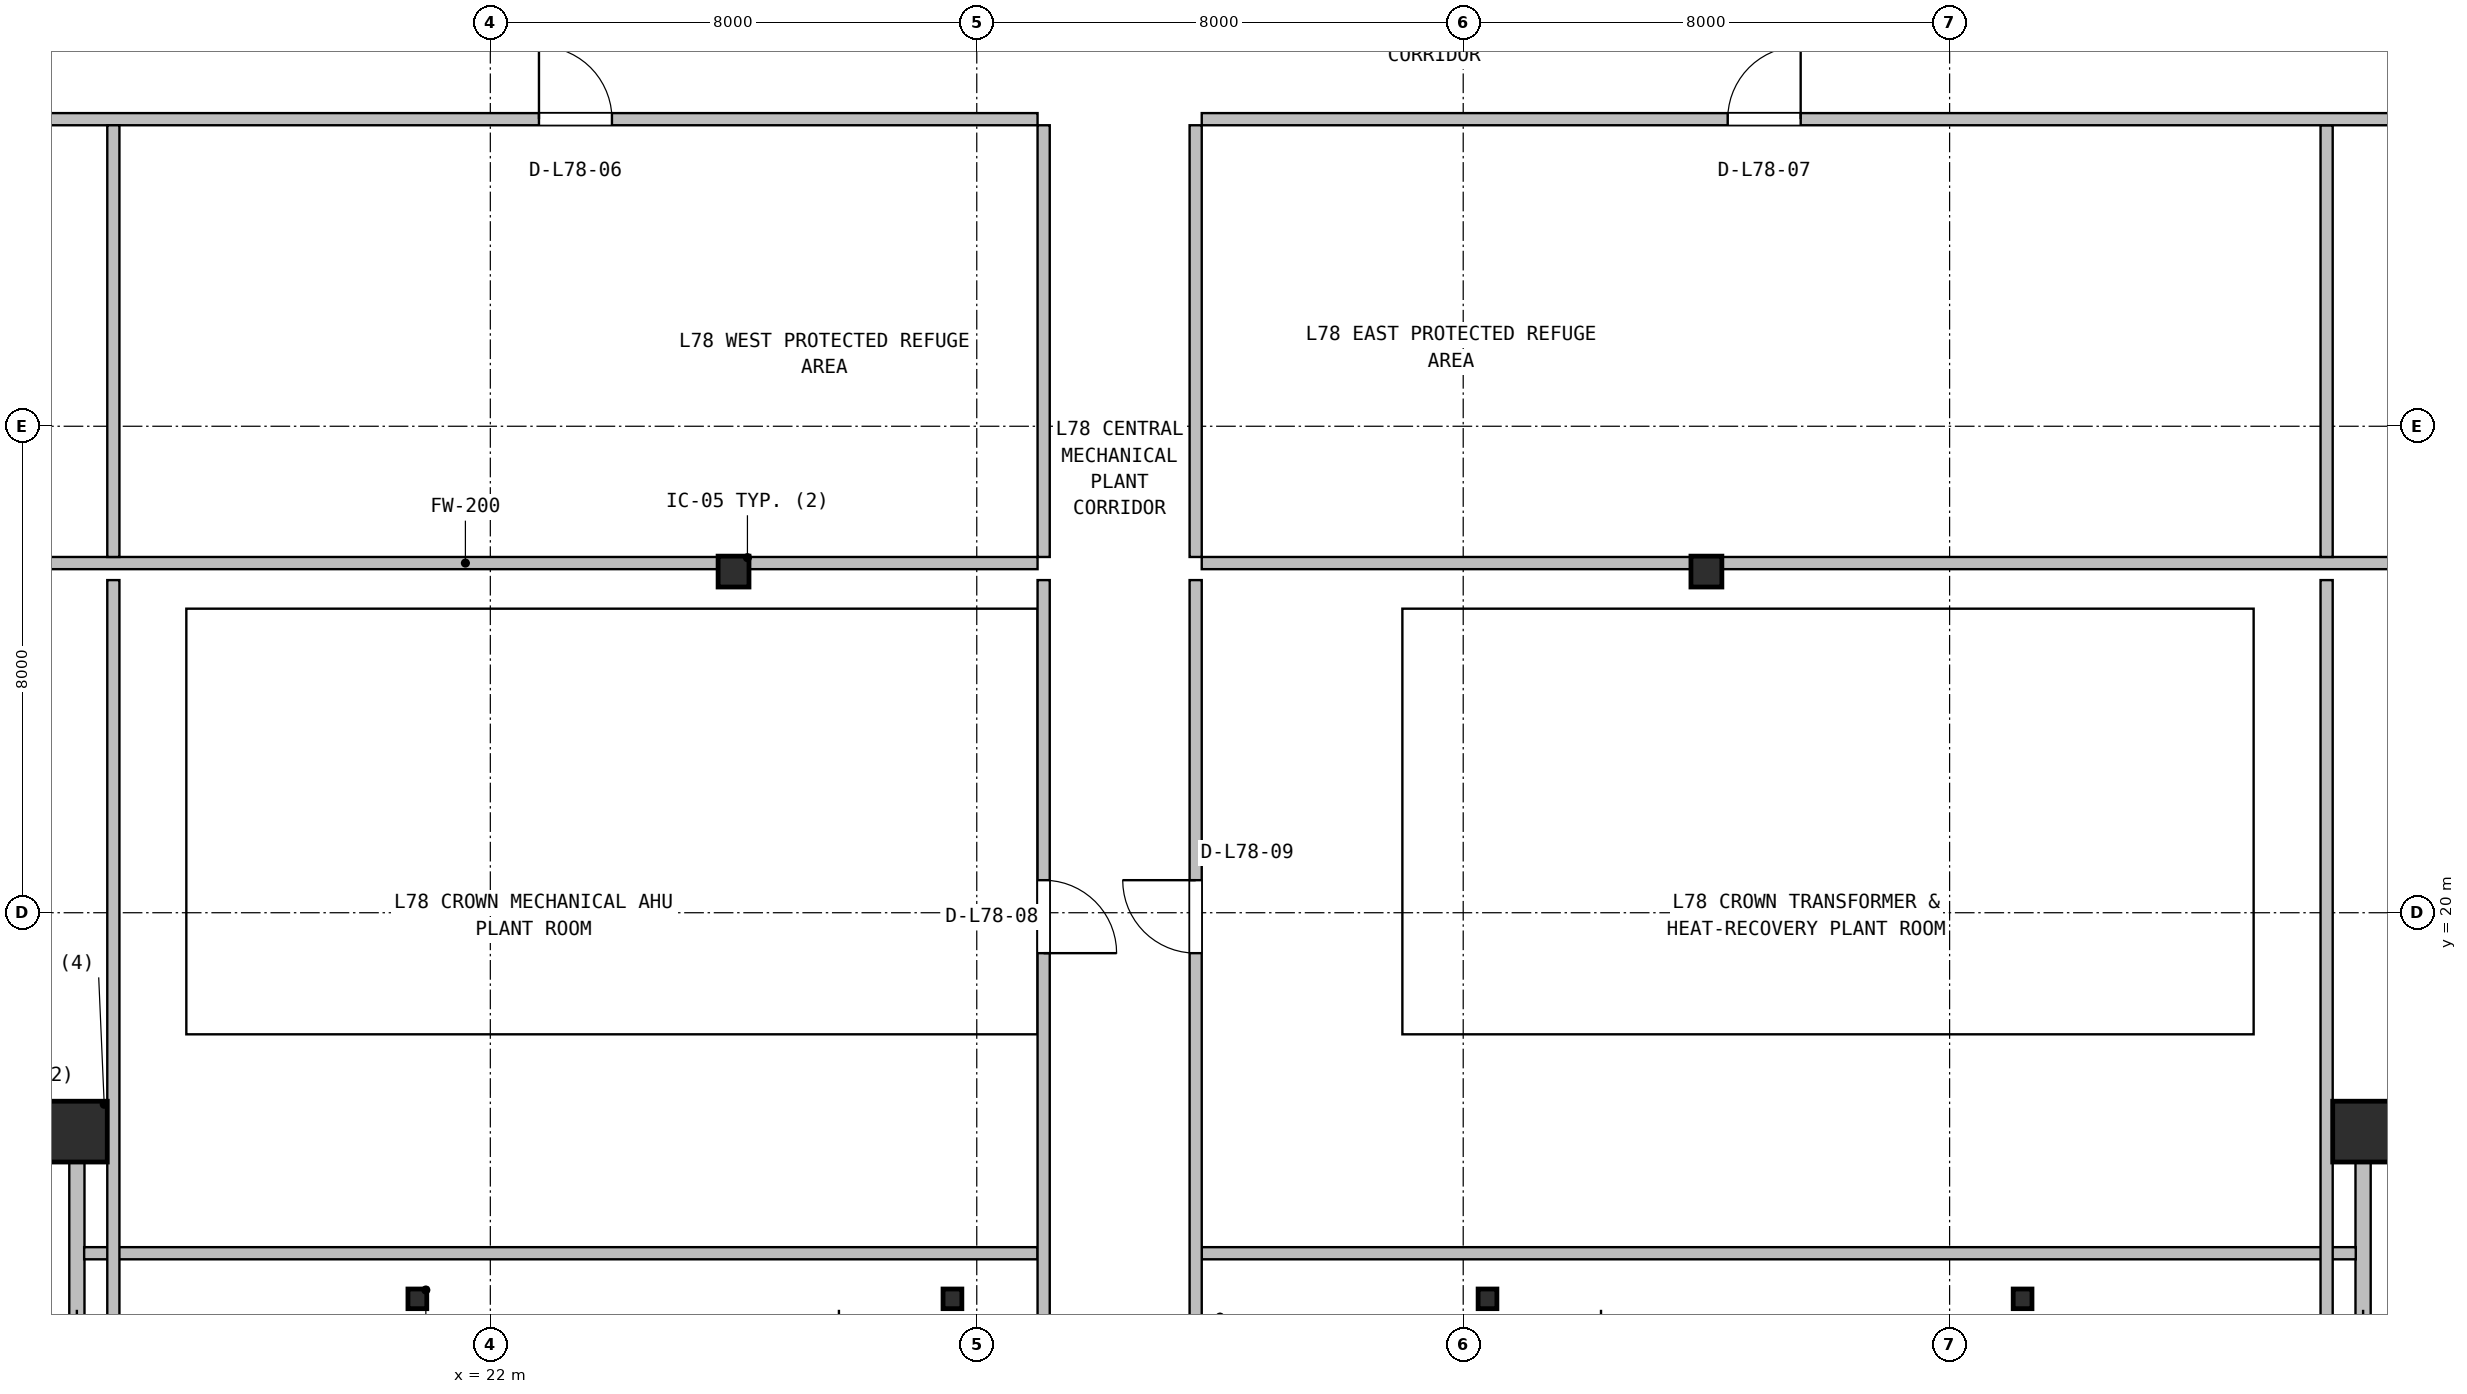
"""IFC4 building model, lengths in metres.
Left out: names, types, materials, properties, quantities, classifications, styles, units other than length and angle.
Written with IfcOpenShell. Run it as: python <this file> out.ifc"""

import sys

from ifc_helpers import new_model, si_unit, direction, frame, frame_2d, origin, origin_2d, place, context, subcontext, project, spatial, rectangle, hollow_rectangle, hollow_circle, i_section, extrude, source, transform, mapped, element, fill, save


model = new_model("IFC4")
c1 = context("Model", 3, precision=1e-05, world=origin(), true_north=direction((0.0, 1.0)))
c2 = subcontext(c1, "Body", "Model", "MODEL_VIEW")
j1 = project(units=[si_unit("LENGTHUNIT", "METRE"), si_unit("PLANEANGLEUNIT", "RADIAN")], contexts=[c1])
p1 = place(None, origin())
s1 = spatial("IfcSite", under=j1, at=p1, CompositionType="ELEMENT")
p2 = place(p1, origin())
s2 = spatial("IfcBuilding", under=s1, at=p2, CompositionType="ELEMENT")
p3 = place(p2, frame((0.0, 0.0, 314.6)))
s3 = spatial("IfcBuildingStorey", under=s2, at=p3, CompositionType="ELEMENT", Elevation=314.6)
m1 = source(origin(), c2, "Body", "SweptSolid", [
    extrude(hollow_rectangle(XDim=1.0, YDim=1.0, WallThickness=0.04, at=origin_2d()), origin(), (0.0, 0.0, 1.0), 5.2),
])
for number, where, z_axis, x_axis in (
    (1, (15.2, 16.4, 0.0), (0.0, 0.0, 1.0), (1.0, 0.0, 0.0)),
    (2, (52.8, 16.4, 0.0), (0.0, 0.0, 1.0), (1.0, 0.0, 0.0)),
):
    element("IfcColumn", number, at=place(p3, frame(where, z_axis=z_axis, x_axis=x_axis)), inside=s3, PredefinedType="COLUMN", context=c2, shape_type="MappedRepresentation", body=[
        mapped(m1, transform((0.0, 0.0, 0.0), x_axis=(1.0, 0.0, 0.0), y_axis=(0.0, 1.0, 0.0), z_axis=(0.0, 0.0, 1.0), scale=1.0)),
    ])
m2 = source(origin(), c2, "Body", "SweptSolid", [
    extrude(i_section(OverallWidth=0.309, OverallDepth=0.323, WebThickness=0.014, FlangeThickness=0.023, FilletRadius=0.015, at=origin_2d()), origin(), (0.0, 0.0, 1.0), 5.2),
])
for number, where, z_axis, x_axis in (
    (3, (20.8, 13.65, 0.0), (0.0, 0.0, 1.0), (1.0, 0.0, 0.0)),
    (4, (29.6, 13.65, 0.0), (0.0, 0.0, 1.0), (1.0, 0.0, 0.0)),
    (5, (38.4, 13.65, 0.0), (0.0, 0.0, 1.0), (1.0, 0.0, 0.0)),
    (6, (47.2, 13.65, 0.0), (0.0, 0.0, 1.0), (1.0, 0.0, 0.0)),
):
    element("IfcColumn", number, at=place(p3, frame(where, z_axis=z_axis, x_axis=x_axis)), inside=s3, PredefinedType="COLUMN", context=c2, shape_type="MappedRepresentation", body=[
        mapped(m2, transform((0.0, 0.0, 0.0), x_axis=(1.0, 0.0, 0.0), y_axis=(0.0, 1.0, 0.0), z_axis=(0.0, 0.0, 1.0), scale=1.0)),
    ])
m3 = source(origin(), c2, "Body", "SweptSolid", [
    extrude(hollow_circle(Radius=0.254, WallThickness=0.02, at=origin_2d()), origin(), (0.0, 0.0, 1.0), 5.2),
])
for number, where, z_axis, x_axis in (
    (7, (26.0, 25.61, 0.0), (0.0, 0.0, 1.0), (1.0, 0.0, 0.0)),
    (8, (42.0, 25.61, 0.0), (0.0, 0.0, 1.0), (1.0, 0.0, 0.0)),
):
    element("IfcColumn", number, at=place(p3, frame(where, z_axis=z_axis, x_axis=x_axis)), inside=s3, PredefinedType="COLUMN", context=c2, shape_type="MappedRepresentation", body=[
        mapped(m3, transform((0.0, 0.0, 0.0), x_axis=(1.0, 0.0, 0.0), y_axis=(0.0, 1.0, 0.0), z_axis=(0.0, 0.0, 1.0), scale=1.0)),
    ])
for number, where, z_axis, x_axis in (
    (9, (15.2, 13.28, 0.0), (0.0, 0.0, 1.0), (0.0, 1.0, 0.0)),
    (10, (52.8, 13.28, 0.0), (0.0, 0.0, 1.0), (0.0, 1.0, 0.0)),
):
    element("IfcWall", number, at=place(p3, frame(where, z_axis=z_axis, x_axis=x_axis)), inside=s3, PredefinedType="SOLIDWALL", context=c2, shape_type="SweptSolid", body=[
        extrude(rectangle(XDim=3.2, YDim=0.25, at=frame_2d((1.6, 0.0))), origin(), (0.0, 0.0, 1.0), 3.525),
    ])
p4 = place(p3, frame((12.18, 25.75, 0.0), z_axis=(0.0, 0.0, 1.0), x_axis=(1.0, 0.0, 0.0)))
e11 = element("IfcWall", 11, at=p4, inside=s3, PredefinedType="SOLIDWALL", context=c2, shape_type="SweptSolid", body=[
    extrude(rectangle(XDim=18.82, YDim=0.2, at=frame_2d((9.41, 0.0))), origin(), (0.0, 0.0, 1.0), 3.525),
])
p5 = place(p3, frame((31.1, 25.85, 0.0), z_axis=(0.0, 0.0, 1.0), x_axis=(0.0, 1.0, 0.0)))
e12 = element("IfcWall", 12, at=p5, inside=s3, PredefinedType="SOLIDWALL", context=c2, shape_type="SweptSolid", body=[
    extrude(rectangle(XDim=7.1, YDim=0.2, at=frame_2d((3.55, 0.0))), origin(), (0.0, 0.0, 1.0), 4.478),
])
p6 = place(p3, frame((12.18, 33.05, 0.0), z_axis=(0.0, 0.0, 1.0), x_axis=(1.0, 0.0, 0.0)))
e13 = element("IfcWall", 13, at=p6, inside=s3, PredefinedType="SOLIDWALL", context=c2, shape_type="SweptSolid", body=[
    extrude(rectangle(XDim=18.82, YDim=0.2, at=frame_2d((9.41, 0.0))), origin(), (0.0, 0.0, 1.0), 3.525),
])
p7 = place(p6, frame((10.62, 0.0, 0.0)))
e14 = element("IfcOpeningElement", 14, at=p7, cuts=e13, PredefinedType="OPENING", context=c2, shape_type="SweptSolid", body=[
    extrude(rectangle(XDim=1.2, YDim=2.1, at=frame_2d((0.6, 1.05))), frame((0.0, 0.11, 0.0), z_axis=(0.0, -1.0, 0.0), x_axis=(1.0, 0.0, 0.0)), (0.0, 0.0, 1.0), 0.22),
])
p8 = place(p3, frame((15.8, 25.85, 0.0), z_axis=(0.0, 0.0, 1.0), x_axis=(0.0, 1.0, 0.0)))
e15 = element("IfcWall", 15, at=p8, inside=s3, PredefinedType="SOLIDWALL", context=c2, shape_type="SweptSolid", body=[
    extrude(rectangle(XDim=7.1, YDim=0.2, at=frame_2d((3.55, 0.0))), origin(), (0.0, 0.0, 1.0), 4.478),
])
p9 = place(p3, frame((33.7, 25.75, 0.0), z_axis=(0.0, 0.0, 1.0), x_axis=(1.0, 0.0, 0.0)))
e16 = element("IfcWall", 16, at=p9, inside=s3, PredefinedType="SOLIDWALL", context=c2, shape_type="SweptSolid", body=[
    extrude(rectangle(XDim=22.12, YDim=0.2, at=frame_2d((11.06, 0.0))), origin(), (0.0, 0.0, 1.0), 3.525),
])
p10 = place(p3, frame((52.2, 25.85, 0.0), z_axis=(0.0, 0.0, 1.0), x_axis=(0.0, 1.0, 0.0)))
e17 = element("IfcWall", 17, at=p10, inside=s3, PredefinedType="SOLIDWALL", context=c2, shape_type="SweptSolid", body=[
    extrude(rectangle(XDim=7.1, YDim=0.2, at=frame_2d((3.55, 0.0))), origin(), (0.0, 0.0, 1.0), 4.478),
])
p11 = place(p3, frame((33.7, 33.05, 0.0), z_axis=(0.0, 0.0, 1.0), x_axis=(1.0, 0.0, 0.0)))
e18 = element("IfcWall", 18, at=p11, inside=s3, PredefinedType="SOLIDWALL", context=c2, shape_type="SweptSolid", body=[
    extrude(rectangle(XDim=22.12, YDim=0.2, at=frame_2d((11.06, 0.0))), origin(), (0.0, 0.0, 1.0), 3.525),
])
p12 = place(p11, frame((8.65, 0.0, 0.0)))
e19 = element("IfcOpeningElement", 19, at=p12, cuts=e18, PredefinedType="OPENING", context=c2, shape_type="SweptSolid", body=[
    extrude(rectangle(XDim=1.2, YDim=2.1, at=frame_2d((0.6, 1.05))), frame((0.0, 0.11, 0.0), z_axis=(0.0, -1.0, 0.0), x_axis=(1.0, 0.0, 0.0)), (0.0, 0.0, 1.0), 0.22),
])
p13 = place(p3, frame((33.6, 25.85, 0.0), z_axis=(0.0, 0.0, 1.0), x_axis=(0.0, 1.0, 0.0)))
e20 = element("IfcWall", 20, at=p13, inside=s3, PredefinedType="SOLIDWALL", context=c2, shape_type="SweptSolid", body=[
    extrude(rectangle(XDim=7.1, YDim=0.2, at=frame_2d((3.55, 0.0))), origin(), (0.0, 0.0, 1.0), 4.478),
])
p14 = place(p3, frame((15.32, 14.4, 0.0), z_axis=(0.0, 0.0, 1.0), x_axis=(1.0, 0.0, 0.0)))
e21 = element("IfcWall", 21, at=p14, inside=s3, PredefinedType="SOLIDWALL", context=c2, shape_type="SweptSolid", body=[
    extrude(rectangle(XDim=15.68, YDim=0.2, at=frame_2d((7.84, 0.0))), origin(), (0.0, 0.0, 1.0), 3.525),
])
p15 = place(p3, frame((31.1, 13.38, 0.0), z_axis=(0.0, 0.0, 1.0), x_axis=(0.0, 1.0, 0.0)))
e22 = element("IfcWall", 22, at=p15, inside=s3, PredefinedType="SOLIDWALL", context=c2, shape_type="SweptSolid", body=[
    extrude(rectangle(XDim=12.09, YDim=0.2, at=frame_2d((6.045, 0.0))), origin(), (0.0, 0.0, 1.0), 3.525),
])
p16 = place(p15, frame((5.955, 0.0, 0.0)))
e23 = element("IfcOpeningElement", 23, at=p16, cuts=e22, PredefinedType="OPENING", context=c2, shape_type="SweptSolid", body=[
    extrude(rectangle(XDim=1.2, YDim=2.1, at=frame_2d((0.6, 1.05))), frame((0.0, 0.11, 0.0), z_axis=(0.0, -1.0, 0.0), x_axis=(1.0, 0.0, 0.0)), (0.0, 0.0, 1.0), 0.22),
])
p17 = place(p3, frame((15.8, 13.38, 0.0), z_axis=(0.0, 0.0, 1.0), x_axis=(0.0, 1.0, 0.0)))
e24 = element("IfcWall", 24, at=p17, inside=s3, PredefinedType="SOLIDWALL", context=c2, shape_type="SweptSolid", body=[
    extrude(rectangle(XDim=12.09, YDim=0.2, at=frame_2d((6.045, 0.0))), origin(), (0.0, 0.0, 1.0), 3.525),
])
p18 = place(p3, frame((33.7, 14.4, 0.0), z_axis=(0.0, 0.0, 1.0), x_axis=(1.0, 0.0, 0.0)))
e25 = element("IfcWall", 25, at=p18, inside=s3, PredefinedType="SOLIDWALL", context=c2, shape_type="SweptSolid", body=[
    extrude(rectangle(XDim=18.98, YDim=0.2, at=frame_2d((9.49, 0.0))), origin(), (0.0, 0.0, 1.0), 3.525),
])
p19 = place(p3, frame((52.2, 13.38, 0.0), z_axis=(0.0, 0.0, 1.0), x_axis=(0.0, 1.0, 0.0)))
e26 = element("IfcWall", 26, at=p19, inside=s3, PredefinedType="SOLIDWALL", context=c2, shape_type="SweptSolid", body=[
    extrude(rectangle(XDim=12.09, YDim=0.2, at=frame_2d((6.045, 0.0))), origin(), (0.0, 0.0, 1.0), 3.525),
])
p20 = place(p3, frame((33.6, 13.38, 0.0), z_axis=(0.0, 0.0, 1.0), x_axis=(0.0, 1.0, 0.0)))
e27 = element("IfcWall", 27, at=p20, inside=s3, PredefinedType="SOLIDWALL", context=c2, shape_type="SweptSolid", body=[
    extrude(rectangle(XDim=12.09, YDim=0.2, at=frame_2d((6.045, 0.0))), origin(), (0.0, 0.0, 1.0), 3.525),
])
p21 = place(p20, frame((5.955, 0.0, 0.0)))
e28 = element("IfcOpeningElement", 28, at=p21, cuts=e27, PredefinedType="OPENING", context=c2, shape_type="SweptSolid", body=[
    extrude(rectangle(XDim=1.2, YDim=2.1, at=frame_2d((0.6, 1.05))), frame((0.0, 0.11, 0.0), z_axis=(0.0, -1.0, 0.0), x_axis=(1.0, 0.0, 0.0)), (0.0, 0.0, 1.0), 0.22),
])
m4 = source(origin(), c2, "Body", "SweptSolid", [
    extrude(rectangle(XDim=1.2, YDim=2.1, at=frame_2d((0.6, 1.05))), frame((0.0, 0.025, 0.0), z_axis=(0.0, -1.0, 0.0), x_axis=(1.0, 0.0, 0.0)), (0.0, 0.0, 1.0), 0.05),
])
p22 = place(p7, origin())
e29 = element("IfcDoor", 29, at=p22, inside=s3, OperationType="SINGLE_SWING_LEFT", PredefinedType="DOOR", context=c2, shape_type="MappedRepresentation", body=[
    mapped(m4, transform((0.0, 0.0, 0.0), x_axis=(1.0, 0.0, 0.0), y_axis=(0.0, 1.0, 0.0), z_axis=(0.0, 0.0, 1.0), scale=1.0)),
])
fill(e14, e29)
p23 = place(p12, origin())
e30 = element("IfcDoor", 30, at=p23, inside=s3, OperationType="SINGLE_SWING_RIGHT", PredefinedType="DOOR", context=c2, shape_type="MappedRepresentation", body=[
    mapped(m4, transform((0.0, 0.0, 0.0), x_axis=(1.0, 0.0, 0.0), y_axis=(0.0, 1.0, 0.0), z_axis=(0.0, 0.0, 1.0), scale=1.0)),
])
fill(e19, e30)
p24 = place(p16, frame((1.2, 0.0, 0.0), z_axis=(0.0, 0.0, 1.0), x_axis=(-1.0, 0.0, 0.0)))
e31 = element("IfcDoor", 31, at=p24, inside=s3, OperationType="SINGLE_SWING_LEFT", PredefinedType="DOOR", context=c2, shape_type="MappedRepresentation", body=[
    mapped(m4, transform((0.0, 0.0, 0.0), x_axis=(1.0, 0.0, 0.0), y_axis=(0.0, 1.0, 0.0), z_axis=(0.0, 0.0, 1.0), scale=1.0)),
])
fill(e23, e31)
p25 = place(p21, origin())
e32 = element("IfcDoor", 32, at=p25, inside=s3, OperationType="SINGLE_SWING_RIGHT", PredefinedType="DOOR", context=c2, shape_type="MappedRepresentation", body=[
    mapped(m4, transform((0.0, 0.0, 0.0), x_axis=(1.0, 0.0, 0.0), y_axis=(0.0, 1.0, 0.0), z_axis=(0.0, 0.0, 1.0), scale=1.0)),
])
fill(e28, e32)
save(model, sys.argv[1])
